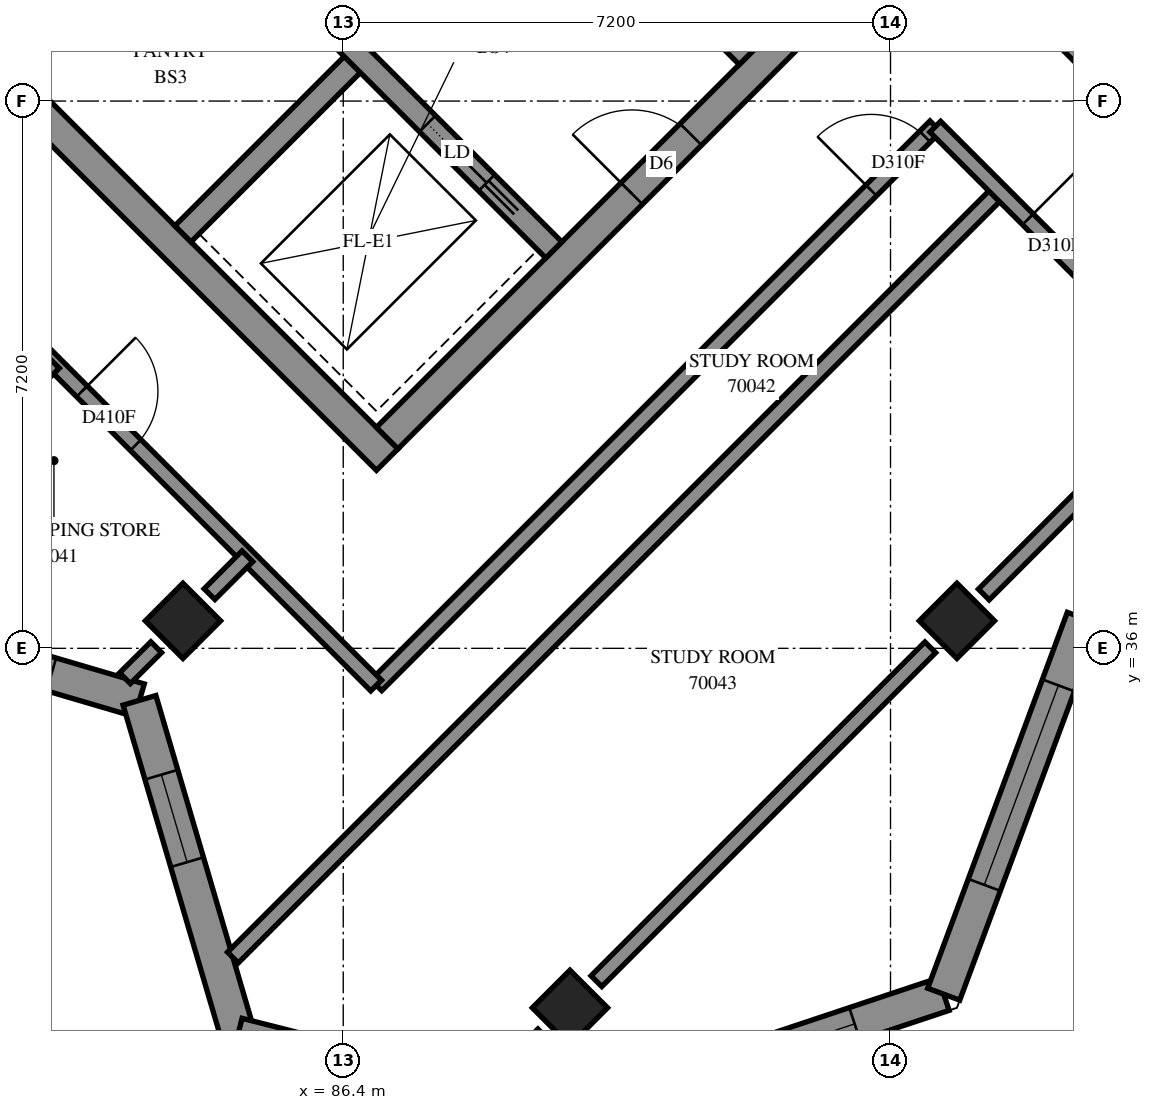
"""IFC4 building model, lengths in metres.
Left out: names, types, materials, properties, quantities, classifications, styles, units other than length and angle.
Written with IfcOpenShell. Run it as: python <this file> out.ifc"""

import sys

from ifc_helpers import new_model, si_unit, direction, frame, frame_2d, origin, origin_2d, place, context, subcontext, project, spatial, polyline, rectangle, outline, extrude, element, fill, save


model = new_model("IFC4")
c1 = context("Model", 3, precision=1e-05, world=origin(), true_north=direction((0.0, 1.0)))
c2 = subcontext(c1, "Body", "Model", "MODEL_VIEW")
j1 = project(units=[si_unit("LENGTHUNIT", "METRE"), si_unit("PLANEANGLEUNIT", "RADIAN")], contexts=[c1])
p1 = place(None, origin())
s1 = spatial("IfcSite", under=j1, at=p1, CompositionType="ELEMENT")
p2 = place(p1, origin())
s2 = spatial("IfcBuilding", under=s1, at=p2, CompositionType="ELEMENT")
p3 = place(p2, frame((0.0, 0.0, 257.4)))
s3 = spatial("IfcBuildingStorey", under=s2, at=p3, CompositionType="ELEMENT", Elevation=257.4)
for number, where, z_axis, x_axis in (
    (1, (84.291, 36.362, 0.0), (0.0, 0.0, 1.0), (0.707, -0.707, 0.0)),
    (2, (94.474, 36.362, 0.0), (0.0, 0.0, 1.0), (0.707, -0.707, 0.0)),
    (3, (89.382, 31.271, 0.0), (0.0, 0.0, 1.0), (0.707, -0.707, 0.0)),
):
    element("IfcColumn", number, at=place(p3, frame(where, z_axis=z_axis, x_axis=x_axis)), inside=s3, PredefinedType="COLUMN", context=c2, shape_type="SweptSolid", body=[
        extrude(rectangle(XDim=0.7, YDim=0.7, at=origin_2d()), origin(), (0.0, 0.0, 1.0), 3.1),
    ])
p4 = place(p3, frame((76.23, 49.231, -0.3), z_axis=(0.0, 0.0, 1.0), x_axis=(0.7071034917, -0.7071100706, 0.0)))
e4 = element("IfcWall", 4, at=p4, inside=s3, PredefinedType="SHEAR", context=c2, shape_type="SweptSolid", body=[
    extrude(rectangle(XDim=15.2, YDim=0.4, at=frame_2d((7.6, 0.0))), origin(), (0.0, 0.0, 1.0), 2.7),
])
p5 = place(p3, frame((86.978, 38.766, -0.3), z_axis=(0.0, 0.0, 1.0), x_axis=(0.7071067812, 0.7071067812, 0.0)))
e5 = element("IfcWall", 5, at=p5, inside=s3, PredefinedType="SHEAR", context=c2, shape_type="SweptSolid", body=[
    extrude(rectangle(XDim=14.4, YDim=0.4, at=frame_2d((7.2, 0.0))), origin(), (0.0, 0.0, 1.0), 2.7),
])
p6 = place(p5, frame((4.55, 0.0, 0.3)))
e6 = element("IfcOpeningElement", 6, at=p6, cuts=e5, PredefinedType="OPENING", context=c2, shape_type="SweptSolid", body=[
    extrude(rectangle(XDim=1.1, YDim=2.1, at=frame_2d((0.55, 1.05))), frame((0.0, 0.21, 0.0), z_axis=(0.0, -1.0, 0.0), x_axis=(1.0, 0.0, 0.0)), (0.0, 0.0, 1.0), 0.42),
])
p7 = place(p5, frame((11.35, 0.0, 0.3)))
e7 = element("IfcOpeningElement", 7, at=p7, cuts=e5, PredefinedType="OPENING", context=c2, shape_type="SweptSolid", body=[
    extrude(rectangle(XDim=1.1, YDim=2.1, at=frame_2d((0.55, 1.05))), frame((0.0, 0.21, 0.0), z_axis=(0.0, -1.0, 0.0), x_axis=(1.0, 0.0, 0.0)), (0.0, 0.0, 1.0), 0.42),
])
p8 = place(p3, frame((84.291, 41.453, 0.0), z_axis=(0.0, 0.0, 1.0), x_axis=(0.7071067812, 0.7071067812, 0.0)))
e8 = element("IfcWall", 8, at=p8, inside=s3, PredefinedType="SOLIDWALL", context=c2, shape_type="SweptSolid", body=[
    extrude(rectangle(XDim=3.3, YDim=0.3, at=frame_2d((1.65, 0.0))), origin(), (0.0, 0.0, 1.0), 3.1),
])
p9 = place(p3, frame((78.988, 51.423, 0.0), z_axis=(0.0, 0.0, 1.0), x_axis=(0.7071067812, -0.7071067812, 0.0)))
e9 = element("IfcWall", 9, at=p9, inside=s3, PredefinedType="SOLIDWALL", context=c2, shape_type="SweptSolid", body=[
    extrude(rectangle(XDim=14.4, YDim=0.3, at=frame_2d((7.2, 0.0))), origin(), (0.0, 0.0, 1.0), 3.1),
])
p10 = place(p9, frame((1.35, 0.0, 0.0)))
e10 = element("IfcOpeningElement", 10, at=p10, cuts=e9, PredefinedType="OPENING", context=c2, shape_type="SweptSolid", body=[
    extrude(rectangle(XDim=0.9, YDim=2.1, at=frame_2d((0.45, 1.05))), frame((0.0, 0.16, 0.0), z_axis=(0.0, -1.0, 0.0), x_axis=(1.0, 0.0, 0.0)), (0.0, 0.0, 1.0), 0.32),
])
p11 = place(p9, frame((4.95, 0.0, 0.0)))
e11 = element("IfcOpeningElement", 11, at=p11, cuts=e9, PredefinedType="OPENING", context=c2, shape_type="SweptSolid", body=[
    extrude(rectangle(XDim=0.9, YDim=2.1, at=frame_2d((0.45, 1.05))), frame((0.0, 0.16, 0.0), z_axis=(0.0, -1.0, 0.0), x_axis=(1.0, 0.0, 0.0)), (0.0, 0.0, 1.0), 0.32),
])
p12 = place(p9, frame((8.55, 0.0, 0.0)))
e12 = element("IfcOpeningElement", 12, at=p12, cuts=e9, PredefinedType="OPENING", context=c2, shape_type="SweptSolid", body=[
    extrude(rectangle(XDim=0.9, YDim=2.1, at=frame_2d((0.45, 1.05))), frame((0.0, 0.16, 0.0), z_axis=(0.0, -1.0, 0.0), x_axis=(1.0, 0.0, 0.0)), (0.0, 0.0, 1.0), 0.32),
])
p13 = place(p9, frame((12.05, 0.0, 0.0)))
e13 = element("IfcOpeningElement", 13, at=p13, cuts=e9, PredefinedType="OPENING", context=c2, shape_type="SweptSolid", body=[
    extrude(rectangle(XDim=1.1, YDim=2.1, at=frame_2d((0.55, 1.05))), frame((0.0, 0.16, 0.0), z_axis=(0.0, -1.0, 0.0), x_axis=(1.0, 0.0, 0.0)), (0.0, 0.0, 1.0), 0.32),
])
p14 = place(p3, frame((81.534, 53.969, 0.0), z_axis=(0.0, 0.0, 1.0), x_axis=(0.707103309, -0.7071102534, 0.0)))
e14 = element("IfcWall", 14, at=p14, inside=s3, PredefinedType="SOLIDWALL", context=c2, shape_type="SweptSolid", body=[
    extrude(rectangle(XDim=14.4, YDim=0.3, at=frame_2d((7.2, 0.0))), origin(), (0.0, 0.0, 1.0), 3.1),
])
p15 = place(p14, frame((8.55, 0.0, 0.0)))
e15 = element("IfcOpeningElement", 15, at=p15, cuts=e14, PredefinedType="OPENING", context=c2, shape_type="SweptSolid", body=[
    extrude(rectangle(XDim=0.9, YDim=2.1, at=frame_2d((0.45, 1.05))), frame((0.0, 0.16, 0.0), z_axis=(0.0, -1.0, 0.0), x_axis=(1.0, 0.0, 0.0)), (0.0, 0.0, 1.0), 0.32),
])
p16 = place(p14, frame((1.25, 0.0, 0.0)))
e16 = element("IfcOpeningElement", 16, at=p16, cuts=e14, PredefinedType="OPENING", context=c2, shape_type="SweptSolid", body=[
    extrude(rectangle(XDim=1.1, YDim=2.1, at=frame_2d((0.55, 1.05))), frame((0.0, 0.16, 0.0), z_axis=(0.0, -1.0, 0.0), x_axis=(1.0, 0.0, 0.0)), (0.0, 0.0, 1.0), 0.32),
])
p17 = place(p14, frame((4.85, 0.0, 0.0)))
e17 = element("IfcOpeningElement", 17, at=p17, cuts=e14, PredefinedType="OPENING", context=c2, shape_type="SweptSolid", body=[
    extrude(rectangle(XDim=1.1, YDim=2.1, at=frame_2d((0.55, 1.05))), frame((0.0, 0.16, 0.0), z_axis=(0.0, -1.0, 0.0), x_axis=(1.0, 0.0, 0.0)), (0.0, 0.0, 1.0), 0.32),
])
p18 = place(p14, frame((12.05, 0.0, 0.0)))
e18 = element("IfcOpeningElement", 18, at=p18, cuts=e14, PredefinedType="OPENING", context=c2, shape_type="SweptSolid", body=[
    extrude(rectangle(XDim=1.1, YDim=2.1, at=frame_2d((0.55, 1.05))), frame((0.0, 0.16, 0.0), z_axis=(0.0, -1.0, 0.0), x_axis=(1.0, 0.0, 0.0)), (0.0, 0.0, 1.0), 0.32),
])
p19 = place(p3, frame((89.374, 29.808, 0.0), z_axis=(0.0, 0.0, 1.0), x_axis=(0.9486852237, 0.3162219889, 0.0)))
e19 = element("IfcWall", 19, at=p19, inside=s3, PredefinedType="SOLIDWALL", context=c2, shape_type="SweptSolid", body=[
    extrude(outline(polyline([(-0.066, -0.225), (5.301, -0.225), (5.085, 0.225), (0.066, 0.225), (-0.066, -0.225)])), origin(), (0.0, 0.0, 1.0), 3.1),
])
p20 = place(p19, frame((1.157, 0.0, 0.45)))
e20 = element("IfcOpeningElement", 20, at=p20, cuts=e19, PredefinedType="OPENING", context=c2, shape_type="SweptSolid", body=[
    extrude(rectangle(XDim=2.8, YDim=2.55, at=frame_2d((1.4, 1.275))), frame((0.0, 0.235, 0.0), z_axis=(0.0, -1.0, 0.0), x_axis=(1.0, 0.0, 0.0)), (0.0, 0.0, 1.0), 0.47),
])
p21 = place(p3, frame((94.3, 31.45, 0.0), z_axis=(0.0, 0.0, 1.0), x_axis=(0.3481927166, 0.9374229739, 0.0)))
e21 = element("IfcWall", 21, at=p21, inside=s3, PredefinedType="SOLIDWALL", context=c2, shape_type="SweptSolid", body=[
    extrude(outline(polyline([(-0.108, -0.225), (5.172, -0.225), (5.379, 0.225), (0.108, 0.225), (-0.108, -0.225)])), origin(), (0.0, 0.0, 1.0), 3.1),
])
p22 = place(p21, frame((1.534, 0.0, 0.45)))
e22 = element("IfcOpeningElement", 22, at=p22, cuts=e21, PredefinedType="OPENING", context=c2, shape_type="SweptSolid", body=[
    extrude(rectangle(XDim=2.8, YDim=2.55, at=frame_2d((1.4, 1.275))), frame((0.0, 0.235, 0.0), z_axis=(0.0, -1.0, 0.0), x_axis=(1.0, 0.0, 0.0)), (0.0, 0.0, 1.0), 0.47),
])
p23 = place(p3, frame((96.137, 36.395, 0.0), z_axis=(0.0, 0.0, 1.0), x_axis=(0.937429161, 0.3481760591, 0.0)))
e23 = element("IfcWall", 23, at=p23, inside=s3, PredefinedType="SOLIDWALL", context=c2, shape_type="SweptSolid", body=[
    extrude(outline(polyline([(0.103, -0.225), (5.383, -0.225), (5.168, 0.225), (-0.103, 0.225), (0.103, -0.225)])), origin(), (0.0, 0.0, 1.0), 3.1),
])
p24 = place(p23, frame((1.651, 0.0, 0.45)))
e24 = element("IfcOpeningElement", 24, at=p24, cuts=e23, PredefinedType="OPENING", context=c2, shape_type="SweptSolid", body=[
    extrude(rectangle(XDim=2.8, YDim=2.55, at=frame_2d((1.4, 1.275))), frame((0.0, 0.235, 0.0), z_axis=(0.0, -1.0, 0.0), x_axis=(1.0, 0.0, 0.0)), (0.0, 0.0, 1.0), 0.47),
])
p25 = place(p3, frame((79.318, 36.61, 0.0), z_axis=(0.0, 0.0, 1.0), x_axis=(0.9593901398, -0.2820825406, 0.0)))
e25 = element("IfcWall", 25, at=p25, inside=s3, PredefinedType="SOLIDWALL", context=c2, shape_type="SweptSolid", body=[
    extrude(outline(polyline([(-0.128, -0.225), (4.465, -0.225), (4.711, 0.225), (0.128, 0.225), (-0.128, -0.225)])), origin(), (0.0, 0.0, 1.0), 3.1),
])
p26 = place(p25, frame((0.579, 0.0, 0.45)))
e26 = element("IfcOpeningElement", 26, at=p26, cuts=e25, PredefinedType="OPENING", context=c2, shape_type="SweptSolid", body=[
    extrude(rectangle(XDim=2.8, YDim=2.55, at=frame_2d((1.4, 1.275))), frame((0.0, 0.235, 0.0), z_axis=(0.0, -1.0, 0.0), x_axis=(1.0, 0.0, 0.0)), (0.0, 0.0, 1.0), 0.47),
])
p27 = place(p3, frame((83.719, 35.316, 0.0), z_axis=(0.0, 0.0, 1.0), x_axis=(0.2820825406, -0.9593901398, 0.0)))
e27 = element("IfcWall", 27, at=p27, inside=s3, PredefinedType="SOLIDWALL", context=c2, shape_type="SweptSolid", body=[
    extrude(outline(polyline([(0.123, -0.225), (4.716, -0.225), (4.46, 0.225), (-0.123, 0.225), (0.123, -0.225)])), origin(), (0.0, 0.0, 1.0), 3.1),
])
p28 = place(p27, frame((1.02, 0.0, 0.45)))
e28 = element("IfcOpeningElement", 28, at=p28, cuts=e27, PredefinedType="OPENING", context=c2, shape_type="SweptSolid", body=[
    extrude(rectangle(XDim=1.2, YDim=2.55, at=frame_2d((0.6, 1.275))), frame((0.0, 0.235, 0.0), z_axis=(0.0, -1.0, 0.0), x_axis=(1.0, 0.0, 0.0)), (0.0, 0.0, 1.0), 0.47),
])
p29 = place(p3, frame((85.014, 30.914, 0.0), z_axis=(0.0, 0.0, 1.0), x_axis=(0.9692746151, -0.2459811384, 0.0)))
e29 = element("IfcWall", 29, at=p29, inside=s3, PredefinedType="SOLIDWALL", context=c2, shape_type="SweptSolid", body=[
    extrude(outline(polyline([(-0.128, -0.225), (4.564, -0.225), (4.432, 0.225), (0.128, 0.225), (-0.128, -0.225)])), origin(), (0.0, 0.0, 1.0), 3.1),
])
p30 = place(p29, frame((2.131, 0.0, 0.45)))
e30 = element("IfcOpeningElement", 30, at=p30, cuts=e29, PredefinedType="OPENING", context=c2, shape_type="SweptSolid", body=[
    extrude(rectangle(XDim=1.2, YDim=2.55, at=frame_2d((0.6, 1.275))), frame((0.0, 0.235, 0.0), z_axis=(0.0, -1.0, 0.0), x_axis=(1.0, 0.0, 0.0)), (0.0, 0.0, 1.0), 0.47),
])
p31 = place(p3, frame((84.949, 31.932, 0.0), z_axis=(0.0, 0.0, 1.0), x_axis=(0.7071768688, 0.7070366866, 0.0)))
e31 = element("IfcWall", 31, at=p31, inside=s3, PredefinedType="PARTITIONING", context=c2, shape_type="SweptSolid", body=[
    extrude(rectangle(XDim=14.267, YDim=0.2, at=frame_2d((7.134, 0.0))), origin(), (0.0, 0.0, 1.0), 3.1),
])
p32 = place(p3, frame((86.836, 35.514, 0.0), z_axis=(0.0, 0.0, 1.0), x_axis=(0.7071067812, 0.7071067812, 0.0)))
e32 = element("IfcWall", 32, at=p32, inside=s3, PredefinedType="PARTITIONING", context=c2, shape_type="SweptSolid", body=[
    extrude(rectangle(XDim=10.4, YDim=0.2, at=frame_2d((5.2, 0.0))), origin(), (0.0, 0.0, 1.0), 3.1),
])
p33 = place(p32, frame((9.207, 0.0, 0.0)))
e33 = element("IfcOpeningElement", 33, at=p33, cuts=e32, PredefinedType="OPENING", context=c2, shape_type="SweptSolid", body=[
    extrude(rectangle(XDim=1.0, YDim=2.1, at=frame_2d((0.5, 1.05))), frame((0.0, 0.11, 0.0), z_axis=(0.0, -1.0, 0.0), x_axis=(1.0, 0.0, 0.0)), (0.0, 0.0, 1.0), 0.22),
])
p34 = place(p3, frame((80.747, 41.597, 0.0), z_axis=(0.0, 0.0, 1.0), x_axis=(0.7071067812, -0.7071067812, 0.0)))
e34 = element("IfcWall", 34, at=p34, inside=s3, PredefinedType="PARTITIONING", context=c2, shape_type="SweptSolid", body=[
    extrude(rectangle(XDim=8.607, YDim=0.2, at=frame_2d((4.303, 0.0))), origin(), (0.0, 0.0, 1.0), 3.1),
])
p35 = place(p34, frame((0.195, 0.0, 0.0)))
e35 = element("IfcOpeningElement", 35, at=p35, cuts=e34, PredefinedType="OPENING", context=c2, shape_type="SweptSolid", body=[
    extrude(rectangle(XDim=1.0, YDim=2.1, at=frame_2d((0.5, 1.05))), frame((0.0, 0.11, 0.0), z_axis=(0.0, -1.0, 0.0), x_axis=(1.0, 0.0, 0.0)), (0.0, 0.0, 1.0), 0.22),
])
p36 = place(p34, frame((3.133, 0.0, 0.0)))
e36 = element("IfcOpeningElement", 36, at=p36, cuts=e34, PredefinedType="OPENING", context=c2, shape_type="SweptSolid", body=[
    extrude(rectangle(XDim=1.0, YDim=2.1, at=frame_2d((0.5, 1.05))), frame((0.0, 0.11, 0.0), z_axis=(0.0, -1.0, 0.0), x_axis=(1.0, 0.0, 0.0)), (0.0, 0.0, 1.0), 0.22),
])
p37 = place(p3, frame((89.731, 31.621, 0.0), z_axis=(0.0, 0.0, 1.0), x_axis=(0.7071067812, 0.7071067812, 0.0)))
e37 = element("IfcWall", 37, at=p37, inside=s3, PredefinedType="PARTITIONING", context=c2, shape_type="SweptSolid", body=[
    extrude(rectangle(XDim=6.211, YDim=0.2, at=frame_2d((3.106, 0.0))), origin(), (0.0, 0.0, 1.0), 2.6),
])
p38 = place(p3, frame((95.603, 44.277, 0.0), z_axis=(0.0, 0.0, 1.0), x_axis=(0.7071067812, -0.7071067812, 0.0)))
e38 = element("IfcWall", 38, at=p38, inside=s3, PredefinedType="PARTITIONING", context=c2, shape_type="SweptSolid", body=[
    extrude(rectangle(XDim=4.797, YDim=0.2, at=frame_2d((2.398, 0.0))), origin(), (0.0, 0.0, 1.0), 3.1),
])
p39 = place(p38, frame((1.723, 0.0, 0.0)))
e39 = element("IfcOpeningElement", 39, at=p39, cuts=e38, PredefinedType="OPENING", context=c2, shape_type="SweptSolid", body=[
    extrude(rectangle(XDim=1.0, YDim=2.1, at=frame_2d((0.5, 1.05))), frame((0.0, 0.11, 0.0), z_axis=(0.0, -1.0, 0.0), x_axis=(1.0, 0.0, 0.0)), (0.0, 0.0, 1.0), 0.22),
])
p40 = place(p3, frame((94.189, 42.863, 0.0), z_axis=(0.0, 0.0, 1.0), x_axis=(0.7071067812, -0.7071067812, 0.0)))
e40 = element("IfcWall", 40, at=p40, inside=s3, PredefinedType="PARTITIONING", context=c2, shape_type="SweptSolid", body=[
    extrude(rectangle(XDim=4.797, YDim=0.2, at=frame_2d((2.398, 0.0))), origin(), (0.0, 0.0, 1.0), 3.1),
])
p41 = place(p40, frame((1.723, 0.0, 0.0)))
e41 = element("IfcOpeningElement", 41, at=p41, cuts=e40, PredefinedType="OPENING", context=c2, shape_type="SweptSolid", body=[
    extrude(rectangle(XDim=1.0, YDim=2.1, at=frame_2d((0.5, 1.05))), frame((0.0, 0.11, 0.0), z_axis=(0.0, -1.0, 0.0), x_axis=(1.0, 0.0, 0.0)), (0.0, 0.0, 1.0), 0.22),
])
p42 = place(p3, frame((79.599, 36.762, 0.0), z_axis=(0.0, 0.0, 1.0), x_axis=(0.7071185876, 0.7070949745, 0.0)))
e42 = element("IfcWall", 42, at=p42, inside=s3, PredefinedType="PARTITIONING", context=c2, shape_type="SweptSolid", body=[
    extrude(rectangle(XDim=4.235, YDim=0.2, at=frame_2d((2.117, 0.0))), origin(), (0.0, 0.0, 1.0), 3.1),
])
p43 = place(p3, frame((94.828, 36.709, 0.0), z_axis=(0.0, 0.0, 1.0), x_axis=(0.7068506295, 0.7073628401, 0.0)))
e43 = element("IfcWall", 43, at=p43, inside=s3, PredefinedType="PARTITIONING", context=c2, shape_type="SweptSolid", body=[
    extrude(rectangle(XDim=3.905, YDim=0.2, at=frame_2d((1.952, 0.0))), origin(), (0.0, 0.0, 1.0), 2.6),
])
p44 = place(p3, frame((88.398, 30.288, 0.0), z_axis=(0.0, 0.0, 1.0), x_axis=(0.7070509474, 0.7071626105, 0.0)))
e44 = element("IfcWall", 44, at=p44, inside=s3, PredefinedType="PARTITIONING", context=c2, shape_type="SweptSolid", body=[
    extrude(rectangle(XDim=0.896, YDim=0.2, at=frame_2d((0.448, 0.0))), origin(), (0.0, 0.0, 1.0), 3.1),
])
p45 = place(p3, frame((84.641, 36.713, 0.0), z_axis=(0.0, 0.0, 1.0), x_axis=(0.7071067812, 0.7071067812, 0.0)))
e45 = element("IfcWall", 45, at=p45, inside=s3, PredefinedType="PARTITIONING", context=c2, shape_type="SweptSolid", body=[
    extrude(rectangle(XDim=0.704, YDim=0.2, at=frame_2d((0.352, 0.0))), origin(), (0.0, 0.0, 1.0), 3.1),
])
p46 = place(p3, frame((83.528, 35.607, 0.0), z_axis=(0.0, 0.0, 1.0), x_axis=(0.7090904806, 0.7051175011, 0.0)))
e46 = element("IfcWall", 46, at=p46, inside=s3, PredefinedType="PARTITIONING", context=c2, shape_type="SweptSolid", body=[
    extrude(rectangle(XDim=0.579, YDim=0.2, at=frame_2d((0.289, 0.0))), origin(), (0.0, 0.0, 1.0), 3.1),
])
p47 = place(p20, origin())
e47 = element("IfcWindow", 47, at=p47, inside=s3, PartitioningType="SINGLE_PANEL", PredefinedType="WINDOW", context=c2, shape_type="SweptSolid", body=[
    extrude(rectangle(XDim=2.8, YDim=2.55, at=frame_2d((1.4, 1.275))), frame((0.0, 0.205, 0.0), z_axis=(0.0, -1.0, 0.0), x_axis=(1.0, 0.0, 0.0)), (0.0, 0.0, 1.0), 0.06),
])
fill(e20, e47)
p48 = place(p22, origin())
e48 = element("IfcWindow", 48, at=p48, inside=s3, PartitioningType="SINGLE_PANEL", PredefinedType="WINDOW", context=c2, shape_type="SweptSolid", body=[
    extrude(rectangle(XDim=2.8, YDim=2.55, at=frame_2d((1.4, 1.275))), frame((0.0, 0.205, 0.0), z_axis=(0.0, -1.0, 0.0), x_axis=(1.0, 0.0, 0.0)), (0.0, 0.0, 1.0), 0.06),
])
fill(e22, e48)
p49 = place(p26, origin())
e49 = element("IfcWindow", 49, at=p49, inside=s3, PartitioningType="SINGLE_PANEL", PredefinedType="WINDOW", context=c2, shape_type="SweptSolid", body=[
    extrude(rectangle(XDim=2.8, YDim=2.55, at=frame_2d((1.4, 1.275))), frame((0.0, 0.205, 0.0), z_axis=(0.0, -1.0, 0.0), x_axis=(1.0, 0.0, 0.0)), (0.0, 0.0, 1.0), 0.06),
])
fill(e26, e49)
p50 = place(p28, origin())
e50 = element("IfcWindow", 50, at=p50, inside=s3, PartitioningType="SINGLE_PANEL", PredefinedType="WINDOW", context=c2, shape_type="SweptSolid", body=[
    extrude(rectangle(XDim=1.2, YDim=2.55, at=frame_2d((0.6, 1.275))), frame((0.0, 0.205, 0.0), z_axis=(0.0, -1.0, 0.0), x_axis=(1.0, 0.0, 0.0)), (0.0, 0.0, 1.0), 0.06),
])
fill(e28, e50)
p51 = place(p6, origin())
e51 = element("IfcDoor", 51, at=p51, inside=s3, OperationType="DOUBLE_DOOR_SINGLE_SWING", PredefinedType="DOOR", context=c2, shape_type="SweptSolid", body=[
    extrude(rectangle(XDim=1.1, YDim=2.1, at=frame_2d((0.55, 1.05))), frame((0.0, 0.025, 0.0), z_axis=(0.0, -1.0, 0.0), x_axis=(1.0, 0.0, 0.0)), (0.0, 0.0, 1.0), 0.05),
])
fill(e6, e51)
p52 = place(p13, origin())
e52 = element("IfcDoor", 52, at=p52, inside=s3, OperationType="SLIDING_TO_RIGHT", PredefinedType="DOOR", context=c2, shape_type="SweptSolid", body=[
    extrude(rectangle(XDim=1.1, YDim=2.1, at=frame_2d((0.55, 1.05))), frame((0.0, 0.025, 0.0), z_axis=(0.0, -1.0, 0.0), x_axis=(1.0, 0.0, 0.0)), (0.0, 0.0, 1.0), 0.05),
])
fill(e13, e52)
p53 = place(p36, origin())
e53 = element("IfcDoor", 53, at=p53, inside=s3, OperationType="SINGLE_SWING_LEFT", PredefinedType="DOOR", context=c2, shape_type="SweptSolid", body=[
    extrude(rectangle(XDim=1.0, YDim=2.1, at=frame_2d((0.5, 1.05))), frame((0.0, 0.025, 0.0), z_axis=(0.0, -1.0, 0.0), x_axis=(1.0, 0.0, 0.0)), (0.0, 0.0, 1.0), 0.05),
])
fill(e36, e53)
p54 = place(p33, origin())
e54 = element("IfcDoor", 54, at=p54, inside=s3, OperationType="SINGLE_SWING_RIGHT", PredefinedType="DOOR", context=c2, shape_type="SweptSolid", body=[
    extrude(rectangle(XDim=1.0, YDim=2.1, at=frame_2d((0.5, 1.05))), frame((0.0, 0.025, 0.0), z_axis=(0.0, -1.0, 0.0), x_axis=(1.0, 0.0, 0.0)), (0.0, 0.0, 1.0), 0.05),
])
fill(e33, e54)
p55 = place(p41, origin())
e55 = element("IfcDoor", 55, at=p55, inside=s3, OperationType="SINGLE_SWING_LEFT", PredefinedType="DOOR", context=c2, shape_type="SweptSolid", body=[
    extrude(rectangle(XDim=1.0, YDim=2.1, at=frame_2d((0.5, 1.05))), frame((0.0, 0.025, 0.0), z_axis=(0.0, -1.0, 0.0), x_axis=(1.0, 0.0, 0.0)), (0.0, 0.0, 1.0), 0.05),
])
fill(e41, e55)
save(model, sys.argv[1])
